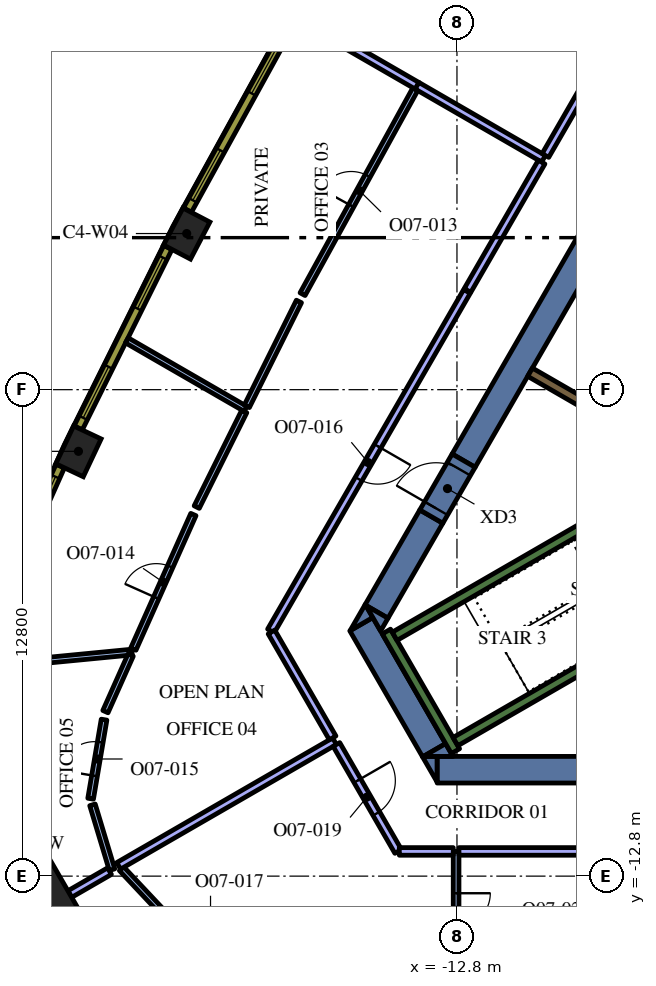
"""IFC4 building model, lengths in metres.
Left out: names, types, materials, properties, quantities, classifications, styles, units other than length and angle.
Written with IfcOpenShell. Run it as: python <this file> out.ifc"""

import sys

from ifc_helpers import new_model, si_unit, direction, frame, frame_2d, origin, origin_2d, place, context, subcontext, project, spatial, polyline, rectangle, outline, extrude, element, fill, save


model = new_model("IFC4")
c1 = context("Model", 3, precision=1e-05, world=origin(), true_north=direction((0.0, 1.0)))
c2 = subcontext(c1, "Body", "Model", "MODEL_VIEW")
j1 = project(units=[si_unit("LENGTHUNIT", "METRE"), si_unit("PLANEANGLEUNIT", "RADIAN")], contexts=[c1])
p1 = place(None, origin())
s1 = spatial("IfcSite", under=j1, at=p1, CompositionType="ELEMENT")
p2 = place(p1, origin())
s2 = spatial("IfcBuilding", under=s1, at=p2, CompositionType="ELEMENT")
p3 = place(p2, frame((0.0, 0.0, 222.6)))
s3 = spatial("IfcBuildingStorey", under=s2, at=p3, CompositionType="ELEMENT", Elevation=222.6)
p4 = place(p3, frame((-24.027, -13.872, 0.0), z_axis=(0.0, 0.0, 1.0), x_axis=(-0.866025403784, -0.5, 0.0)))
e1 = element("IfcColumn", 1, at=p4, inside=s3, PredefinedType="COLUMN", context=c2, shape_type="SweptSolid", body=[
    extrude(rectangle(XDim=2.4, YDim=2.4, at=origin_2d()), origin(), (0.0, 0.0, 1.0), 4.2),
])
for number, where, z_axis, x_axis in (
    (2, (-19.912, 4.108, 0.0), (0.0, 0.0, 1.0), (-0.464, -0.886, 0.0)),
    (3, (-22.76, -1.623, 0.0), (0.0, 0.0, 1.0), (-0.426, -0.905, 0.0)),
):
    element("IfcColumn", number, at=place(p3, frame(where, z_axis=z_axis, x_axis=x_axis)), inside=s3, PredefinedType="COLUMN", context=c2, shape_type="SweptSolid", body=[
        extrude(rectangle(XDim=1.1, YDim=0.8, at=origin_2d()), origin(), (0.0, 0.0, 1.0), 4.2),
    ])
p5 = place(p3, frame((8.904, -10.0, 0.0), z_axis=(0.0, 0.0, 1.0), x_axis=(-1.0, 0.0, 0.0)))
e4 = element("IfcWall", 4, at=p5, inside=s3, PredefinedType="SOLIDWALL", context=c2, shape_type="SweptSolid", body=[
    extrude(rectangle(XDim=22.226, YDim=0.7, at=frame_2d((11.113, 0.0))), origin(), (0.0, 0.0, 1.0), 4.2),
])
p6 = place(p3, origin())
e5 = element("IfcWall", 5, at=p6, inside=s3, PredefinedType="SOLIDWALL", context=c2, shape_type="SweptSolid", body=[
    extrude(outline(polyline([(-13.712, -9.65), (-13.324, -9.65), (-13.324, -10.322), (-13.712, -9.65)])), origin(), (0.0, 0.0, 1.0), 4.2),
])
p7 = place(p3, frame((-13.402, -9.487, 0.0), z_axis=(0.0, 0.0, 1.0), x_axis=(-0.500020498207, 0.866013568815, 0.0)))
e6 = element("IfcWall", 6, at=p7, inside=s3, PredefinedType="SOLIDWALL", context=c2, shape_type="SweptSolid", body=[
    extrude(rectangle(XDim=3.829, YDim=0.7, at=frame_2d((1.915, 0.0))), origin(), (0.0, 0.0, 1.0), 4.2),
])
e7 = element("IfcWall", 7, at=p6, inside=s3, PredefinedType="SOLIDWALL", context=c2, shape_type="SweptSolid", body=[
    extrude(outline(polyline([(-15.014, -5.995), (-15.611, -6.339), (-15.213, -5.65), (-15.014, -5.995)])), origin(), (0.0, 0.0, 1.0), 4.2),
])
e8 = element("IfcWall", 8, at=p6, inside=s3, PredefinedType="SOLIDWALL", context=c2, shape_type="SweptSolid", body=[
    extrude(outline(polyline([(-12.904, -9.65), (-13.68, -9.65), (-13.098, -9.314), (-12.904, -9.65)])), origin(), (0.0, 0.0, 1.0), 4.2),
])
p8 = place(p3, frame((-13.475, -3.339, 0.0), z_axis=(0.0, 0.0, 1.0), x_axis=(-0.499944726303, -0.866057313716, 0.0)))
e9 = element("IfcWall", 9, at=p8, inside=s3, PredefinedType="SOLIDWALL", context=c2, shape_type="SweptSolid", body=[
    extrude(rectangle(XDim=2.884, YDim=0.7, at=frame_2d((1.442, 0.0))), origin(), (0.0, 0.0, 1.0), 4.2),
])
e10 = element("IfcWall", 10, at=p6, inside=s3, PredefinedType="SOLIDWALL", context=c2, shape_type="SweptSolid", body=[
    extrude(outline(polyline([(-14.809, -6.35), (-15.197, -5.678), (-14.615, -6.014), (-14.809, -6.35)])), origin(), (0.0, 0.0, 1.0), 4.2),
])
p9 = place(p3, frame((-12.625, -1.867, 0.0), z_axis=(0.0, 0.0, 1.0), x_axis=(0.500008520515, 0.866020484407, 0.0)))
e11 = element("IfcWall", 11, at=p9, inside=s3, PredefinedType="SOLIDWALL", context=c2, shape_type="SweptSolid", body=[
    extrude(rectangle(XDim=15.859, YDim=0.7, at=frame_2d((7.929, 0.0))), origin(), (0.0, 0.0, 1.0), 4.2),
])
p10 = place(p3, frame((-12.84, -9.511, 0.0), z_axis=(0.0, 0.0, 1.0), x_axis=(-0.499997733992, 0.866026712061, 0.0)))
e12 = element("IfcWall", 12, at=p10, inside=s3, PredefinedType="SOLIDWALL", context=c2, shape_type="SweptSolid", body=[
    extrude(rectangle(XDim=3.634, YDim=0.25, at=frame_2d((1.817, 0.0))), origin(), (0.0, 0.0, 1.0), 4.2),
])
p11 = place(p3, frame((-14.44, -6.49, 0.0), z_axis=(0.0, 0.0, 1.0), x_axis=(0.866022966069, 0.500004222222, 0.0)))
e13 = element("IfcWall", 13, at=p11, inside=s3, PredefinedType="SOLIDWALL", context=c2, shape_type="SweptSolid", body=[
    extrude(rectangle(XDim=6.8, YDim=0.25, at=frame_2d((3.4, 0.0))), origin(), (0.0, 0.0, 1.0), 4.2),
])
p12 = place(p3, frame((-12.84, -9.261, 0.0), z_axis=(0.0, 0.0, 1.0), x_axis=(0.866016039709, 0.500016218704, 0.0)))
e14 = element("IfcWall", 14, at=p12, inside=s3, PredefinedType="SOLIDWALL", context=c2, shape_type="SweptSolid", body=[
    extrude(rectangle(XDim=7.05, YDim=0.25, at=frame_2d((3.525, 0.0))), origin(), (0.0, 0.0, 1.0), 4.2),
])
p13 = place(p3, frame((-8.106, -1.14, 0.0), z_axis=(0.0, 0.0, 1.0), x_axis=(-0.866008981251, 0.500028443584, 0.0)))
e15 = element("IfcWall", 15, at=p13, inside=s3, PredefinedType="SOLIDWALL", context=c2, shape_type="SweptSolid", body=[
    extrude(rectangle(XDim=3.2, YDim=0.25, at=frame_2d((1.6, 0.0))), origin(), (0.0, 0.0, 1.0), 4.2),
])
p14 = place(p3, frame((-13.475, -3.339, 0.0), z_axis=(0.0, 0.0, 1.0), x_axis=(0.499954529098, 0.86605165483, 0.0)))
e16 = element("IfcWall", 16, at=p14, inside=s3, PredefinedType="SOLIDWALL", context=c2, shape_type="SweptSolid", body=[
    extrude(rectangle(XDim=1.7, YDim=0.7, at=frame_2d((0.85, 0.0))), origin(), (0.0, 0.0, 1.0), 4.2),
])
p15 = place(p14, frame((0.25, 0.0, 0.0)))
e17 = element("IfcOpeningElement", 17, at=p15, cuts=e16, PredefinedType="OPENING", context=c2, shape_type="SweptSolid", body=[
    extrude(rectangle(XDim=1.2, YDim=2.1, at=frame_2d((0.6, 1.05))), frame((0.0, 0.36, 0.0), z_axis=(0.0, -1.0, 0.0), x_axis=(1.0, 0.0, 0.0)), (0.0, 0.0, 1.0), 0.72),
])
p16 = place(p3, frame((-13.844, 7.993, 0.0), z_axis=(0.0, 0.0, 1.0), x_axis=(-0.866003976688, 0.500037110984, 0.0)))
e18 = element("IfcWall", 18, at=p16, inside=s3, PredefinedType="PARTITIONING", context=c2, shape_type="SweptSolid", body=[
    extrude(rectangle(XDim=3.045, YDim=0.2, at=frame_2d((1.522, 0.0))), origin(), (0.0, 0.0, 1.0), 3.45),
])
p17 = place(p3, frame((-10.522, 6.075, 0.0), z_axis=(0.0, 0.0, 1.0), x_axis=(-0.866002601515, 0.500039492609, 0.0)))
e19 = element("IfcWall", 19, at=p17, inside=s3, PredefinedType="PARTITIONING", context=c2, shape_type="SweptSolid", body=[
    extrude(rectangle(XDim=3.844, YDim=0.2, at=frame_2d((1.922, 0.0))), origin(), (0.0, 0.0, 1.0), 3.45),
])
p18 = place(p3, frame((-8.522, 9.539, 0.0), z_axis=(0.0, 0.0, 1.0), x_axis=(-0.499997012787, -0.866027128446, 0.0)))
e20 = element("IfcWall", 20, at=p18, inside=s3, PredefinedType="PARTITIONING", context=c2, shape_type="SweptSolid", body=[
    extrude(rectangle(XDim=3.9, YDim=0.2, at=frame_2d((1.95, 0.0))), origin(), (0.0, 0.0, 1.0), 3.45),
])
p19 = place(p3, frame((-18.363, -0.506, 0.0), z_axis=(0.0, 0.0, 1.0), x_axis=(-0.866048087663, 0.499960708312, 0.0)))
e21 = element("IfcWall", 21, at=p19, inside=s3, PredefinedType="PARTITIONING", context=c2, shape_type="SweptSolid", body=[
    extrude(rectangle(XDim=3.607, YDim=0.15, at=frame_2d((1.804, 0.0))), origin(), (0.0, 0.0, 1.0), 3.45),
])
p20 = place(p3, frame((-16.863, 2.513, 0.0), z_axis=(0.0, 0.0, 1.0), x_axis=(0.48192483879, 0.876212559689, 0.0)))
e22 = element("IfcWall", 22, at=p20, inside=s3, PredefinedType="PARTITIONING", context=c2, shape_type="SweptSolid", body=[
    extrude(rectangle(XDim=6.157, YDim=0.15, at=frame_2d((3.078, 0.0))), origin(), (0.0, 0.0, 1.0), 3.45),
])
p21 = place(p20, frame((2.657, 0.0, 0.0)))
e23 = element("IfcOpeningElement", 23, at=p21, cuts=e22, PredefinedType="OPENING", context=c2, shape_type="SweptSolid", body=[
    extrude(rectangle(XDim=0.9, YDim=2.1, at=frame_2d((0.45, 1.05))), frame((0.0, 0.085, 0.0), z_axis=(0.0, -1.0, 0.0), x_axis=(1.0, 0.0, 0.0)), (0.0, 0.0, 1.0), 0.17),
])
p22 = place(p3, frame((-16.958, 2.321, 0.0), z_axis=(0.0, 0.0, 1.0), x_axis=(-0.445184199442, -0.895439014432, 0.0)))
e24 = element("IfcWall", 24, at=p22, inside=s3, PredefinedType="PARTITIONING", context=c2, shape_type="SweptSolid", body=[
    extrude(rectangle(XDim=3.082, YDim=0.15, at=frame_2d((1.541, 0.0))), origin(), (0.0, 0.0, 1.0), 3.45),
])
p23 = place(p3, frame((-21.351, -6.904, 0.0), z_axis=(0.0, 0.0, 1.0), x_axis=(-0.995356631468, -0.096255785242, 0.0)))
e25 = element("IfcWall", 25, at=p23, inside=s3, PredefinedType="PARTITIONING", context=c2, shape_type="SweptSolid", body=[
    extrude(rectangle(XDim=3.536, YDim=0.15, at=frame_2d((1.768, 0.0))), origin(), (0.0, 0.0, 1.0), 3.45),
])
p24 = place(p3, frame((-18.397, -0.573, 0.0), z_axis=(0.0, 0.0, 1.0), x_axis=(-0.445162501923, -0.89544980143, 0.0)))
e26 = element("IfcWall", 26, at=p24, inside=s3, PredefinedType="PARTITIONING", context=c2, shape_type="SweptSolid", body=[
    extrude(rectangle(XDim=2.811, YDim=0.15, at=frame_2d((1.405, 0.0))), origin(), (0.0, 0.0, 1.0), 3.45),
])
p25 = place(p3, frame((-21.316, -6.826, 0.0), z_axis=(0.0, 0.0, 1.0), x_axis=(0.407639588163, 0.913142905663, 0.0)))
e27 = element("IfcWall", 27, at=p25, inside=s3, PredefinedType="PARTITIONING", context=c2, shape_type="SweptSolid", body=[
    extrude(rectangle(XDim=3.877, YDim=0.15, at=frame_2d((1.938, 0.0))), origin(), (0.0, 0.0, 1.0), 3.45),
])
p26 = place(p25, frame((1.477, 0.0, 0.0)))
e28 = element("IfcOpeningElement", 28, at=p26, cuts=e27, PredefinedType="OPENING", context=c2, shape_type="SweptSolid", body=[
    extrude(rectangle(XDim=0.9, YDim=2.1, at=frame_2d((0.45, 1.05))), frame((0.0, 0.085, 0.0), z_axis=(0.0, -1.0, 0.0), x_axis=(1.0, 0.0, 0.0)), (0.0, 0.0, 1.0), 0.17),
])
p27 = place(p3, frame((-21.386, -6.983, 0.0), z_axis=(0.0, 0.0, 1.0), x_axis=(-0.407597309494, -0.91316177827, 0.0)))
e29 = element("IfcWall", 29, at=p27, inside=s3, PredefinedType="PARTITIONING", context=c2, shape_type="SweptSolid", body=[
    extrude(rectangle(XDim=1.63, YDim=0.15, at=frame_2d((0.815, 0.0))), origin(), (0.0, 0.0, 1.0), 3.45),
])
p28 = place(p3, frame((-22.44, -10.763, 0.0), z_axis=(0.0, 0.0, 1.0), x_axis=(0.167682096872, 0.985841120257, 0.0)))
e30 = element("IfcWall", 30, at=p28, inside=s3, PredefinedType="PARTITIONING", context=c2, shape_type="SweptSolid", body=[
    extrude(rectangle(XDim=2.11, YDim=0.15, at=frame_2d((1.055, 0.0))), origin(), (0.0, 0.0, 1.0), 3.45),
])
p29 = place(p28, frame((0.61, 0.0, 0.0)))
e31 = element("IfcOpeningElement", 31, at=p29, cuts=e30, PredefinedType="OPENING", context=c2, shape_type="SweptSolid", body=[
    extrude(rectangle(XDim=0.9, YDim=2.1, at=frame_2d((0.45, 1.05))), frame((0.0, 0.085, 0.0), z_axis=(0.0, -1.0, 0.0), x_axis=(1.0, 0.0, 0.0)), (0.0, 0.0, 1.0), 0.17),
])
p30 = place(p3, frame((-22.391, -10.924, 0.0), z_axis=(0.0, 0.0, 1.0), x_axis=(0.288642134652, -0.957437056993, 0.0)))
e32 = element("IfcWall", 32, at=p30, inside=s3, PredefinedType="PARTITIONING", context=c2, shape_type="SweptSolid", body=[
    extrude(rectangle(XDim=1.782, YDim=0.15, at=frame_2d((0.891, 0.0))), origin(), (0.0, 0.0, 1.0), 3.45),
])
p31 = place(p3, frame((-21.943, -12.669, 0.0), z_axis=(0.0, 0.0, 1.0), x_axis=(-0.866030586491, -0.499991023182, 0.0)))
e33 = element("IfcWall", 33, at=p31, inside=s3, PredefinedType="PARTITIONING", context=c2, shape_type="SweptSolid", body=[
    extrude(rectangle(XDim=1.207, YDim=0.2, at=frame_2d((0.603, 0.0))), origin(), (0.0, 0.0, 1.0), 3.45),
])
p32 = place(p3, frame((-16.021, -9.25, 0.0), z_axis=(0.0, 0.0, 1.0), x_axis=(-0.866021955858, -0.500005971936, 0.0)))
e34 = element("IfcWall", 34, at=p32, inside=s3, PredefinedType="PARTITIONING", context=c2, shape_type="SweptSolid", body=[
    extrude(rectangle(XDim=6.56, YDim=0.2, at=frame_2d((3.28, 0.0))), origin(), (0.0, 0.0, 1.0), 3.45),
])
p33 = place(p3, frame((-10.572, 5.988, 0.0), z_axis=(0.0, 0.0, 1.0), x_axis=(-0.499997012787, -0.866027128446, 0.0)))
e35 = element("IfcWall", 35, at=p33, inside=s3, PredefinedType="PARTITIONING", context=c2, shape_type="SweptSolid", body=[
    extrude(rectangle(XDim=3.9, YDim=0.2, at=frame_2d((1.95, 0.0))), origin(), (0.0, 0.0, 1.0), 3.45),
])
p34 = place(p3, frame((-12.537, 2.585, 0.0), z_axis=(0.0, 0.0, 1.0), x_axis=(-0.500002393198, -0.866024022066, 0.0)))
e36 = element("IfcWall", 36, at=p34, inside=s3, PredefinedType="PARTITIONING", context=c2, shape_type="SweptSolid", body=[
    extrude(rectangle(XDim=10.317, YDim=0.2, at=frame_2d((5.159, 0.0))), origin(), (0.0, 0.0, 1.0), 3.45),
])
p35 = place(p34, frame((4.7, 0.0, 0.0)))
e37 = element("IfcOpeningElement", 37, at=p35, cuts=e36, PredefinedType="OPENING", context=c2, shape_type="SweptSolid", body=[
    extrude(rectangle(XDim=1.0, YDim=2.1, at=frame_2d((0.5, 1.05))), frame((0.0, 0.11, 0.0), z_axis=(0.0, -1.0, 0.0), x_axis=(1.0, 0.0, 0.0)), (0.0, 0.0, 1.0), 0.22),
])
p36 = place(p3, frame((-17.681, -6.376, 0.0), z_axis=(0.0, 0.0, 1.0), x_axis=(0.500022299258, -0.866012528919, 0.0)))
e38 = element("IfcWall", 38, at=p36, inside=s3, PredefinedType="PARTITIONING", context=c2, shape_type="SweptSolid", body=[
    extrude(rectangle(XDim=3.219, YDim=0.2, at=frame_2d((1.609, 0.0))), origin(), (0.0, 0.0, 1.0), 3.45),
])
p37 = place(p3, frame((-21.628, -12.603, 0.0), z_axis=(0.0, 0.0, 1.0), x_axis=(0.684778496912, -0.728751267695, 0.0)))
e39 = element("IfcWall", 39, at=p37, inside=s3, PredefinedType="PARTITIONING", context=c2, shape_type="SweptSolid", body=[
    extrude(rectangle(XDim=1.754, YDim=0.15, at=frame_2d((0.877, 0.0))), origin(), (0.0, 0.0, 1.0), 3.45),
])
p38 = place(p3, frame((-12.823, -12.15, 0.0), z_axis=(0.0, 0.0, 1.0), x_axis=(0.0, -1.0, 0.0)))
e40 = element("IfcWall", 40, at=p38, inside=s3, PredefinedType="PARTITIONING", context=c2, shape_type="SweptSolid", body=[
    extrude(rectangle(XDim=3.011, YDim=0.15, at=frame_2d((1.505, 0.0))), origin(), (0.0, 0.0, 1.0), 3.45),
])
p39 = place(p38, frame((1.1, 0.0, 0.0)))
e41 = element("IfcOpeningElement", 41, at=p39, cuts=e40, PredefinedType="OPENING", context=c2, shape_type="SweptSolid", body=[
    extrude(rectangle(XDim=0.9, YDim=2.1, at=frame_2d((0.45, 1.05))), frame((0.0, 0.085, 0.0), z_axis=(0.0, -1.0, 0.0), x_axis=(1.0, 0.0, 0.0)), (0.0, 0.0, 1.0), 0.17),
])
p40 = place(p3, frame((-15.971, -9.337, 0.0), z_axis=(0.0, 0.0, 1.0), x_axis=(0.500010870188, -0.866019127788, 0.0)))
e42 = element("IfcWall", 42, at=p40, inside=s3, PredefinedType="PARTITIONING", context=c2, shape_type="SweptSolid", body=[
    extrude(rectangle(XDim=3.249, YDim=0.2, at=frame_2d((1.624, 0.0))), origin(), (0.0, 0.0, 1.0), 3.45),
])
p41 = place(p40, frame((1.1, 0.0, 0.0)))
e43 = element("IfcOpeningElement", 43, at=p41, cuts=e42, PredefinedType="OPENING", context=c2, shape_type="SweptSolid", body=[
    extrude(rectangle(XDim=1.0, YDim=2.1, at=frame_2d((0.5, 1.05))), frame((0.0, 0.11, 0.0), z_axis=(0.0, -1.0, 0.0), x_axis=(1.0, 0.0, 0.0)), (0.0, 0.0, 1.0), 0.22),
])
p42 = place(p3, frame((-14.317, -12.15, 0.0), z_axis=(0.0, 0.0, 1.0), x_axis=(1.0, 0.0, 0.0)))
e44 = element("IfcWall", 44, at=p42, inside=s3, PredefinedType="PARTITIONING", context=c2, shape_type="SweptSolid", body=[
    extrude(rectangle(XDim=1.419, YDim=0.2, at=frame_2d((0.71, 0.0))), origin(), (0.0, 0.0, 1.0), 3.45),
])
p43 = place(p3, frame((-12.748, -12.15, 0.0), z_axis=(0.0, 0.0, 1.0), x_axis=(1.0, 0.0, 0.0)))
e45 = element("IfcWall", 45, at=p43, inside=s3, PredefinedType="PARTITIONING", context=c2, shape_type="SweptSolid", body=[
    extrude(rectangle(XDim=8.718, YDim=0.2, at=frame_2d((4.359, 0.0))), origin(), (0.0, 0.0, 1.0), 3.45),
])
p44 = place(p3, frame((-17.338, 9.368, 0.0), z_axis=(0.0, 0.0, 1.0), x_axis=(-0.481925825015, -0.876212017256, 0.0)))
e46 = element("IfcWall", 46, at=p44, inside=s3, PredefinedType="SOLIDWALL", context=c2, shape_type="SweptSolid", body=[
    extrude(rectangle(XDim=5.299, YDim=0.24, at=frame_2d((2.649, 0.0))), origin(), (0.0, 0.0, 1.0), 3.95),
])
p45 = place(p44, frame((0.295, 0.0, 0.9)))
e47 = element("IfcOpeningElement", 47, at=p45, cuts=e46, PredefinedType="OPENING", context=c2, shape_type="SweptSolid", body=[
    extrude(rectangle(XDim=1.5, YDim=2.55, at=frame_2d((0.75, 1.275))), frame((0.0, 0.13, 0.0), z_axis=(0.0, -1.0, 0.0), x_axis=(1.0, 0.0, 0.0)), (0.0, 0.0, 1.0), 0.26),
])
p46 = place(p44, frame((3.504, 0.0, 0.9)))
e48 = element("IfcOpeningElement", 48, at=p46, cuts=e46, PredefinedType="OPENING", context=c2, shape_type="SweptSolid", body=[
    extrude(rectangle(XDim=1.5, YDim=2.55, at=frame_2d((0.75, 1.275))), frame((0.0, 0.13, 0.0), z_axis=(0.0, -1.0, 0.0), x_axis=(1.0, 0.0, 0.0)), (0.0, 0.0, 1.0), 0.26),
])
p47 = place(p3, frame((-20.407, 3.74, 0.0), z_axis=(0.0, 0.0, 1.0), x_axis=(-0.445129582031, -0.895466166419, 0.0)))
e49 = element("IfcWall", 49, at=p47, inside=s3, PredefinedType="SOLIDWALL", context=c2, shape_type="SweptSolid", body=[
    extrude(rectangle(XDim=5.298, YDim=0.24, at=frame_2d((2.649, 0.0))), origin(), (0.0, 0.0, 1.0), 3.95),
])
p48 = place(p47, frame((0.295, 0.0, 0.9)))
e50 = element("IfcOpeningElement", 50, at=p48, cuts=e49, PredefinedType="OPENING", context=c2, shape_type="SweptSolid", body=[
    extrude(rectangle(XDim=1.5, YDim=2.55, at=frame_2d((0.75, 1.275))), frame((0.0, 0.13, 0.0), z_axis=(0.0, -1.0, 0.0), x_axis=(1.0, 0.0, 0.0)), (0.0, 0.0, 1.0), 0.26),
])
p49 = place(p47, frame((3.504, 0.0, 0.9)))
e51 = element("IfcOpeningElement", 51, at=p49, cuts=e49, PredefinedType="OPENING", context=c2, shape_type="SweptSolid", body=[
    extrude(rectangle(XDim=1.5, YDim=2.55, at=frame_2d((0.75, 1.275))), frame((0.0, 0.13, 0.0), z_axis=(0.0, -1.0, 0.0), x_axis=(1.0, 0.0, 0.0)), (0.0, 0.0, 1.0), 0.26),
])
p50 = place(p3, frame((-23.24, -2.011, 0.0), z_axis=(0.0, 0.0, 1.0), x_axis=(-0.407579651789, -0.913169659728, 0.0)))
e52 = element("IfcWall", 52, at=p50, inside=s3, PredefinedType="SOLIDWALL", context=c2, shape_type="SweptSolid", body=[
    extrude(rectangle(XDim=5.311, YDim=0.24, at=frame_2d((2.655, 0.0))), origin(), (0.0, 0.0, 1.0), 3.95),
])
p51 = place(p50, frame((0.306, 0.0, 0.9)))
e53 = element("IfcOpeningElement", 53, at=p51, cuts=e52, PredefinedType="OPENING", context=c2, shape_type="SweptSolid", body=[
    extrude(rectangle(XDim=1.5, YDim=2.55, at=frame_2d((0.75, 1.275))), frame((0.0, 0.13, 0.0), z_axis=(0.0, -1.0, 0.0), x_axis=(1.0, 0.0, 0.0)), (0.0, 0.0, 1.0), 0.26),
])
p52 = place(p50, frame((3.539, 0.0, 0.9)))
e54 = element("IfcOpeningElement", 54, at=p52, cuts=e52, PredefinedType="OPENING", context=c2, shape_type="SweptSolid", body=[
    extrude(rectangle(XDim=1.5, YDim=2.55, at=frame_2d((0.75, 1.275))), frame((0.0, 0.13, 0.0), z_axis=(0.0, -1.0, 0.0), x_axis=(1.0, 0.0, 0.0)), (0.0, 0.0, 1.0), 0.26),
])
p53 = place(p15, origin())
e55 = element("IfcDoor", 55, at=p53, inside=s3, OperationType="SINGLE_SWING_LEFT", PredefinedType="DOOR", context=c2, shape_type="SweptSolid", body=[
    extrude(rectangle(XDim=1.2, YDim=2.1, at=frame_2d((0.6, 1.05))), frame((0.0, 0.025, 0.0), z_axis=(0.0, -1.0, 0.0), x_axis=(1.0, 0.0, 0.0)), (0.0, 0.0, 1.0), 0.05),
])
fill(e17, e55)
p54 = place(p21, origin())
e56 = element("IfcDoor", 56, at=p54, inside=s3, OperationType="SINGLE_SWING_RIGHT", PredefinedType="DOOR", context=c2, shape_type="SweptSolid", body=[
    extrude(rectangle(XDim=0.9, YDim=2.1, at=frame_2d((0.45, 1.05))), frame((0.0, 0.025, 0.0), z_axis=(0.0, -1.0, 0.0), x_axis=(1.0, 0.0, 0.0)), (0.0, 0.0, 1.0), 0.05),
])
fill(e23, e56)
p55 = place(p26, origin())
e57 = element("IfcDoor", 57, at=p55, inside=s3, OperationType="SINGLE_SWING_LEFT", PredefinedType="DOOR", context=c2, shape_type="SweptSolid", body=[
    extrude(rectangle(XDim=0.9, YDim=2.1, at=frame_2d((0.45, 1.05))), frame((0.0, 0.025, 0.0), z_axis=(0.0, -1.0, 0.0), x_axis=(1.0, 0.0, 0.0)), (0.0, 0.0, 1.0), 0.05),
])
fill(e28, e57)
p56 = place(p29, origin())
e58 = element("IfcDoor", 58, at=p56, inside=s3, OperationType="SINGLE_SWING_RIGHT", PredefinedType="DOOR", context=c2, shape_type="SweptSolid", body=[
    extrude(rectangle(XDim=0.9, YDim=2.1, at=frame_2d((0.45, 1.05))), frame((0.0, 0.025, 0.0), z_axis=(0.0, -1.0, 0.0), x_axis=(1.0, 0.0, 0.0)), (0.0, 0.0, 1.0), 0.05),
])
fill(e31, e58)
p57 = place(p35, origin())
e59 = element("IfcDoor", 59, at=p57, inside=s3, OperationType="SINGLE_SWING_RIGHT", PredefinedType="DOOR", context=c2, shape_type="SweptSolid", body=[
    extrude(rectangle(XDim=1.0, YDim=2.1, at=frame_2d((0.5, 1.05))), frame((0.0, 0.025, 0.0), z_axis=(0.0, -1.0, 0.0), x_axis=(1.0, 0.0, 0.0)), (0.0, 0.0, 1.0), 0.05),
])
fill(e37, e59)
p58 = place(p41, origin())
e60 = element("IfcDoor", 60, at=p58, inside=s3, OperationType="SINGLE_SWING_LEFT", PredefinedType="DOOR", context=c2, shape_type="SweptSolid", body=[
    extrude(rectangle(XDim=1.0, YDim=2.1, at=frame_2d((0.5, 1.05))), frame((0.0, 0.025, 0.0), z_axis=(0.0, -1.0, 0.0), x_axis=(1.0, 0.0, 0.0)), (0.0, 0.0, 1.0), 0.05),
])
fill(e43, e60)
p59 = place(p39, origin())
e61 = element("IfcDoor", 61, at=p59, inside=s3, OperationType="SINGLE_SWING_RIGHT", PredefinedType="DOOR", context=c2, shape_type="SweptSolid", body=[
    extrude(rectangle(XDim=0.9, YDim=2.1, at=frame_2d((0.45, 1.05))), frame((0.0, 0.025, 0.0), z_axis=(0.0, -1.0, 0.0), x_axis=(1.0, 0.0, 0.0)), (0.0, 0.0, 1.0), 0.05),
])
fill(e41, e61)
p60 = place(p45, origin())
e62 = element("IfcWindow", 62, at=p60, inside=s3, PartitioningType="SINGLE_PANEL", PredefinedType="WINDOW", context=c2, shape_type="SweptSolid", body=[
    extrude(rectangle(XDim=1.5, YDim=2.55, at=frame_2d((0.75, 1.275))), frame((0.0, 0.04, 0.0), z_axis=(0.0, -1.0, 0.0), x_axis=(1.0, 0.0, 0.0)), (0.0, 0.0, 1.0), 0.06),
])
fill(e47, e62)
p61 = place(p46, origin())
e63 = element("IfcWindow", 63, at=p61, inside=s3, PartitioningType="SINGLE_PANEL", PredefinedType="WINDOW", context=c2, shape_type="SweptSolid", body=[
    extrude(rectangle(XDim=1.5, YDim=2.55, at=frame_2d((0.75, 1.275))), frame((0.0, 0.04, 0.0), z_axis=(0.0, -1.0, 0.0), x_axis=(1.0, 0.0, 0.0)), (0.0, 0.0, 1.0), 0.06),
])
fill(e48, e63)
p62 = place(p48, origin())
e64 = element("IfcWindow", 64, at=p62, inside=s3, PartitioningType="SINGLE_PANEL", PredefinedType="WINDOW", context=c2, shape_type="SweptSolid", body=[
    extrude(rectangle(XDim=1.5, YDim=2.55, at=frame_2d((0.75, 1.275))), frame((0.0, 0.04, 0.0), z_axis=(0.0, -1.0, 0.0), x_axis=(1.0, 0.0, 0.0)), (0.0, 0.0, 1.0), 0.06),
])
fill(e50, e64)
p63 = place(p49, origin())
e65 = element("IfcWindow", 65, at=p63, inside=s3, PartitioningType="SINGLE_PANEL", PredefinedType="WINDOW", context=c2, shape_type="SweptSolid", body=[
    extrude(rectangle(XDim=1.5, YDim=2.55, at=frame_2d((0.75, 1.275))), frame((0.0, 0.04, 0.0), z_axis=(0.0, -1.0, 0.0), x_axis=(1.0, 0.0, 0.0)), (0.0, 0.0, 1.0), 0.06),
])
fill(e51, e65)
p64 = place(p51, origin())
e66 = element("IfcWindow", 66, at=p64, inside=s3, PartitioningType="SINGLE_PANEL", PredefinedType="WINDOW", context=c2, shape_type="SweptSolid", body=[
    extrude(rectangle(XDim=1.5, YDim=2.55, at=frame_2d((0.75, 1.275))), frame((0.0, 0.04, 0.0), z_axis=(0.0, -1.0, 0.0), x_axis=(1.0, 0.0, 0.0)), (0.0, 0.0, 1.0), 0.06),
])
fill(e53, e66)
save(model, sys.argv[1])
